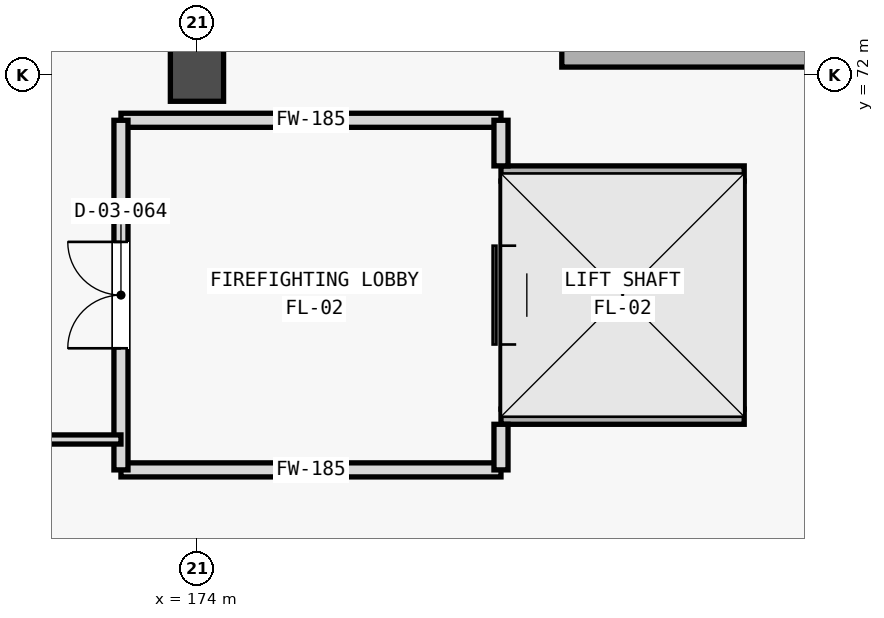
"""IFC4 building model, lengths in metres.
Left out: names, types, materials, properties, quantities, classifications, styles, units other than length and angle.
Written with IfcOpenShell. Run it as: python <this file> out.ifc"""

import sys

from ifc_helpers import new_model, si_unit, direction, frame, frame_2d, origin, origin_2d, place, context, subcontext, project, spatial, rectangle, extrude, element, fill, save


model = new_model("IFC4")
c1 = context("Model", 3, precision=1e-05, world=origin(), true_north=direction((0.0, 1.0)))
c2 = subcontext(c1, "Body", "Model", "MODEL_VIEW")
j1 = project(units=[si_unit("LENGTHUNIT", "METRE"), si_unit("PLANEANGLEUNIT", "RADIAN")], contexts=[c1])
p1 = place(None, origin())
s1 = spatial("IfcSite", under=j1, at=p1, CompositionType="ELEMENT")
p2 = place(p1, origin())
s2 = spatial("IfcBuilding", under=s1, at=p2, CompositionType="ELEMENT")
p3 = place(p2, frame((0.0, 0.0, 5.4)))
s3 = spatial("IfcBuildingStorey", under=s2, at=p3, CompositionType="ELEMENT", Elevation=5.4)
p4 = place(p3, frame((174.0, 72.0, 0.0), z_axis=(0.0, 0.0, 1.0), x_axis=(1.0, 0.0, 0.0)))
e1 = element("IfcColumn", 1, at=p4, inside=s3, PredefinedType="COLUMN", context=c2, shape_type="SweptSolid", body=[
    extrude(rectangle(XDim=0.7, YDim=0.7, at=origin_2d()), origin(), (0.0, 0.0, 1.0), 4.55),
])
p5 = place(p3, frame((178.8, 72.225, 0.0), z_axis=(0.0, 0.0, 1.0), x_axis=(1.0, 0.0, 0.0)))
e2 = element("IfcWall", 2, at=p5, inside=s3, PredefinedType="SHEAR", context=c2, shape_type="SweptSolid", body=[
    extrude(rectangle(XDim=5.2, YDim=0.25, at=frame_2d((2.6, 0.0))), origin(), (0.0, 0.0, 1.0), 4.8),
])
for number, where, z_axis, x_axis in (
    (3, (178.0, 67.5, 0.0), (0.0, 0.0, 1.0), (1.0, 0.0, 0.0)),
    (4, (178.0, 70.7, 0.0), (0.0, 0.0, 1.0), (1.0, 0.0, 0.0)),
):
    element("IfcWall", number, at=place(p3, frame(where, z_axis=z_axis, x_axis=x_axis)), inside=s3, PredefinedType="SHEAR", context=c2, shape_type="SweptSolid", body=[
        extrude(rectangle(XDim=3.2, YDim=0.2, at=frame_2d((1.6, 0.0))), origin(), (0.0, 0.0, 1.0), 4.8),
    ])
p6 = place(p3, frame((178.1, 67.6, 0.0), z_axis=(0.0, 0.0, 1.0), x_axis=(0.0, 1.0, 0.0)))
e5 = element("IfcWall", 5, at=p6, inside=s3, PredefinedType="SHEAR", context=c2, shape_type="SweptSolid", body=[
    extrude(rectangle(XDim=3.0, YDim=0.2, at=frame_2d((1.5, 0.0))), origin(), (0.0, 0.0, 1.0), 4.8),
])
p7 = place(p6, frame((0.85, 0.0, 0.0)))
e6 = element("IfcOpeningElement", 6, at=p7, cuts=e5, PredefinedType="OPENING", context=c2, shape_type="SweptSolid", body=[
    extrude(rectangle(XDim=1.3, YDim=2.3, at=frame_2d((0.65, 1.15))), frame((0.0, 0.11, 0.0), z_axis=(0.0, -1.0, 0.0), x_axis=(1.0, 0.0, 0.0)), (0.0, 0.0, 1.0), 0.22),
])
p8 = place(p3, frame((181.1, 67.6, 0.0), z_axis=(0.0, 0.0, 1.0), x_axis=(0.0, 1.0, 0.0)))
e7 = element("IfcWall", 7, at=p8, inside=s3, PredefinedType="SHEAR", context=c2, shape_type="SweptSolid", body=[
    extrude(rectangle(XDim=3.0, YDim=0.2, at=frame_2d((1.5, 0.0))), origin(), (0.0, 0.0, 1.0), 4.8),
])
for number, where, z_axis, x_axis in (
    (8, (178.0, 66.8, 0.0), (0.0, 0.0, 1.0), (-1.0, 0.0, 0.0)),
    (9, (173.0, 71.4, 0.0), (0.0, 0.0, 1.0), (1.0, 0.0, 0.0)),
):
    element("IfcWall", number, at=place(p3, frame(where, z_axis=z_axis, x_axis=x_axis)), inside=s3, PredefinedType="STANDARD", context=c2, shape_type="SweptSolid", body=[
        extrude(rectangle(XDim=5.0, YDim=0.185, at=frame_2d((2.5, 0.0))), origin(), (0.0, 0.0, 1.0), 3.83),
    ])
p9 = place(p3, frame((173.0, 66.8, 0.0), z_axis=(0.0, 0.0, 1.0), x_axis=(0.0, 1.0, 0.0)))
e10 = element("IfcWall", 10, at=p9, inside=s3, PredefinedType="STANDARD", context=c2, shape_type="SweptSolid", body=[
    extrude(rectangle(XDim=4.6, YDim=0.185, at=frame_2d((2.3, 0.0))), origin(), (0.0, 0.0, 1.0), 3.83),
])
p10 = place(p9, frame((1.6, 0.0, 0.0)))
e11 = element("IfcOpeningElement", 11, at=p10, cuts=e10, PredefinedType="OPENING", context=c2, shape_type="SweptSolid", body=[
    extrude(rectangle(XDim=1.4, YDim=2.2, at=frame_2d((0.7, 1.1))), frame((0.0, 0.103, 0.0), z_axis=(0.0, -1.0, 0.0), x_axis=(1.0, 0.0, 0.0)), (0.0, 0.0, 1.0), 0.205),
])
for number, where, z_axis, x_axis in (
    (12, (178.0, 66.8, 0.0), (0.0, 0.0, 1.0), (0.0, 1.0, 0.0)),
    (13, (178.0, 70.8, 0.0), (0.0, 0.0, 1.0), (0.0, 1.0, 0.0)),
):
    element("IfcWall", number, at=place(p3, frame(where, z_axis=z_axis, x_axis=x_axis)), inside=s3, PredefinedType="STANDARD", context=c2, shape_type="SweptSolid", body=[
        extrude(rectangle(XDim=0.6, YDim=0.185, at=frame_2d((0.3, 0.0))), origin(), (0.0, 0.0, 1.0), 3.83),
    ])
p11 = place(p3, frame((165.0, 67.2, 0.0), z_axis=(0.0, 0.0, 1.0), x_axis=(1.0, 0.0, 0.0)))
e14 = element("IfcWall", 14, at=p11, inside=s3, PredefinedType="PARTITIONING", context=c2, shape_type="SweptSolid", body=[
    extrude(rectangle(XDim=8.0, YDim=0.12, at=frame_2d((4.0, 0.0))), origin(), (0.0, 0.0, 1.0), 4.26),
])
p12 = place(p7, origin())
e15 = element("IfcDoor", 15, at=p12, inside=s3, OperationType="SLIDING_TO_RIGHT", PredefinedType="DOOR", context=c2, shape_type="SweptSolid", body=[
    extrude(rectangle(XDim=1.3, YDim=2.3, at=frame_2d((0.65, 1.15))), frame((0.0, 0.025, 0.0), z_axis=(0.0, -1.0, 0.0), x_axis=(1.0, 0.0, 0.0)), (0.0, 0.0, 1.0), 0.05),
])
fill(e6, e15)
p13 = place(p10, origin())
e16 = element("IfcDoor", 16, at=p13, inside=s3, OperationType="DOUBLE_DOOR_SINGLE_SWING", PredefinedType="DOOR", context=c2, shape_type="SweptSolid", body=[
    extrude(rectangle(XDim=1.4, YDim=2.2, at=frame_2d((0.7, 1.1))), frame((0.0, 0.025, 0.0), z_axis=(0.0, -1.0, 0.0), x_axis=(1.0, 0.0, 0.0)), (0.0, 0.0, 1.0), 0.05),
])
fill(e11, e16)
save(model, sys.argv[1])
